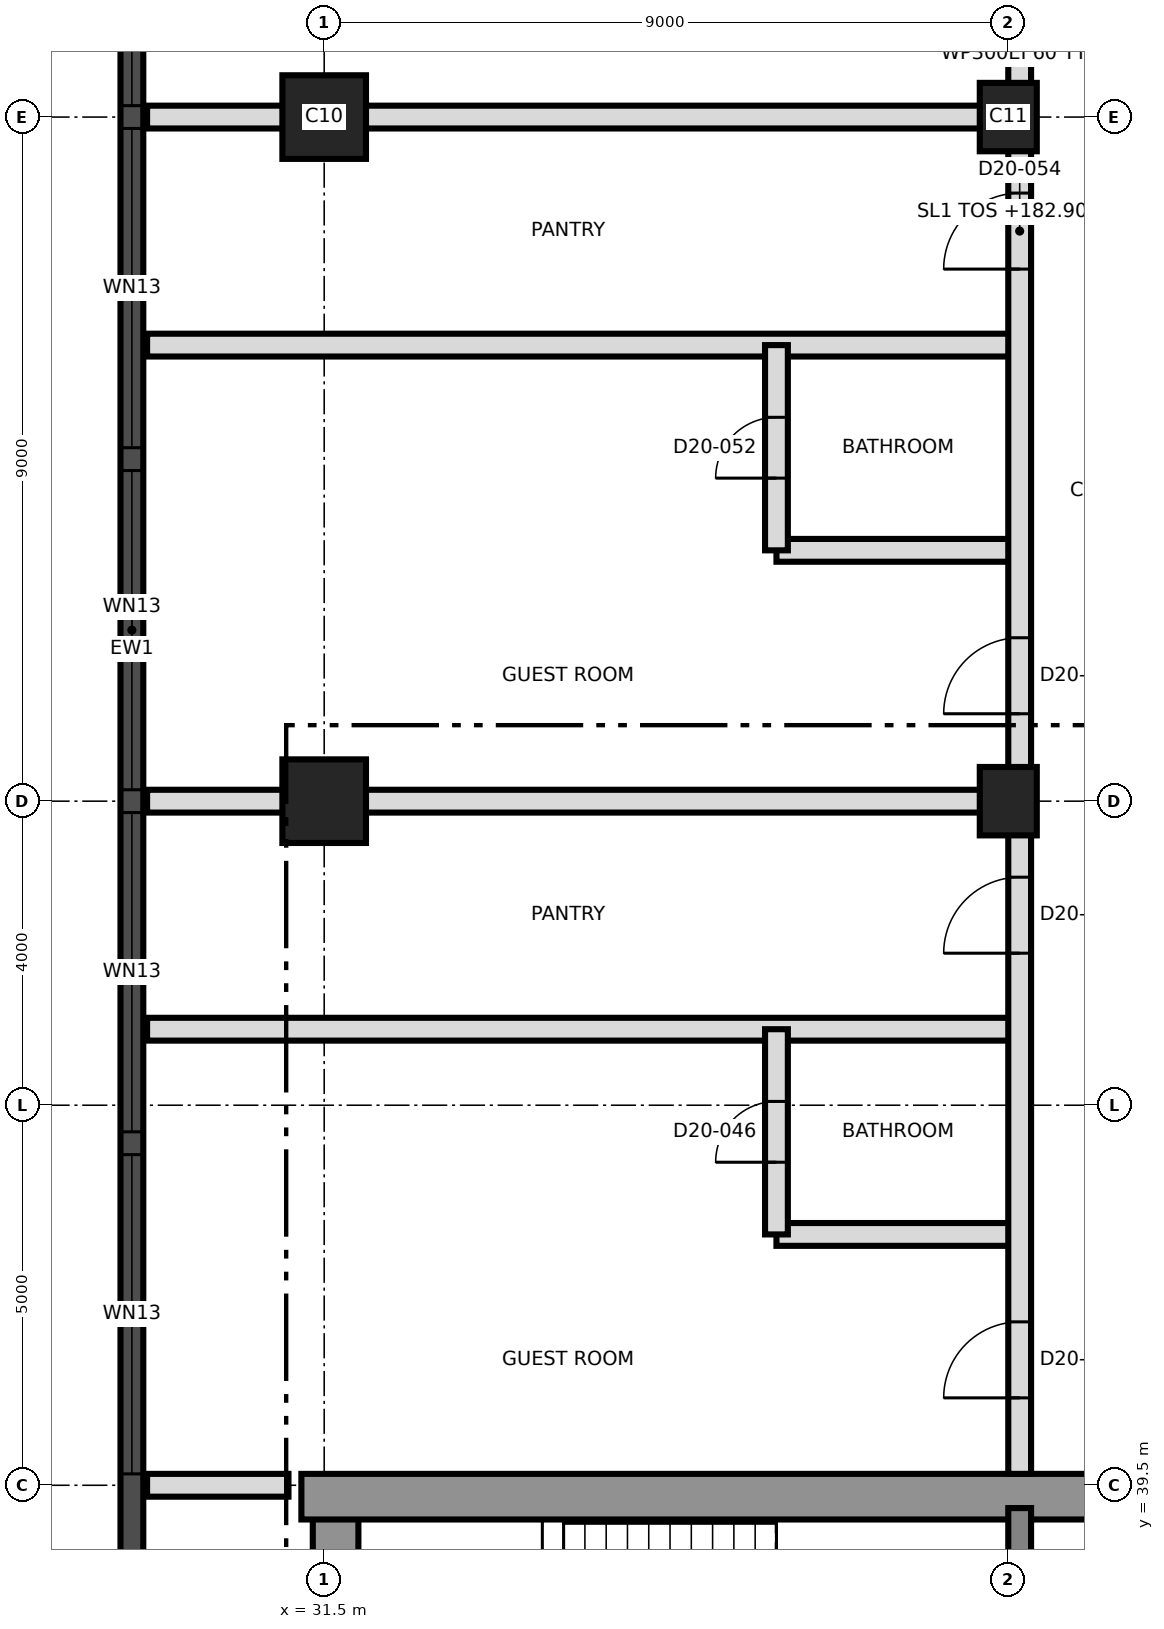
"""IFC4 building model, lengths in metres.
Left out: names, types, materials, properties, quantities, classifications, styles, units other than length and angle.
Written with IfcOpenShell. Run it as: python <this file> out.ifc"""

import sys

from ifc_helpers import new_model, si_unit, direction, frame, frame_2d, origin, origin_2d, place, context, subcontext, project, spatial, rectangle, extrude, element, fill, save


model = new_model("IFC4")
c1 = context("Model", 3, precision=1e-05, world=origin(), true_north=direction((0.0, 1.0)))
c2 = subcontext(c1, "Body", "Model", "MODEL_VIEW")
j1 = project(units=[si_unit("LENGTHUNIT", "METRE"), si_unit("PLANEANGLEUNIT", "RADIAN")], contexts=[c1])
p1 = place(None, origin())
s1 = spatial("IfcSite", under=j1, at=p1, CompositionType="ELEMENT")
p2 = place(p1, origin())
s2 = spatial("IfcBuilding", under=s1, at=p2, CompositionType="ELEMENT")
p3 = place(p2, frame((0.0, 0.0, 182.9)))
s3 = spatial("IfcBuildingStorey", under=s2, at=p3, CompositionType="ELEMENT", Elevation=182.9)
p4 = place(p3, frame((31.65, 21.8, 0.0), z_axis=(0.0, 0.0, 1.0), x_axis=(0.0, 1.0, 0.0)))
e1 = element("IfcWall", 1, at=p4, inside=s3, PredefinedType="SHEAR", context=c2, shape_type="SweptSolid", body=[
    extrude(rectangle(XDim=17.4, YDim=0.6, at=frame_2d((8.7, 0.0))), origin(), (0.0, 0.0, 1.0), 3.7),
])
p5 = place(p3, frame((31.2, 39.35, 0.0), z_axis=(0.0, 0.0, 1.0), x_axis=(1.0, 0.0, 0.0)))
e2 = element("IfcWall", 2, at=p5, inside=s3, PredefinedType="SHEAR", context=c2, shape_type="SweptSolid", body=[
    extrude(rectangle(XDim=27.0, YDim=0.6, at=frame_2d((13.5, 0.0))), origin(), (0.0, 0.0, 1.0), 3.7),
])
p6 = place(p5, frame((10.5, 0.0, 0.0)))
e3 = element("IfcOpeningElement", 3, at=p6, cuts=e2, PredefinedType="OPENING", context=c2, shape_type="SweptSolid", body=[
    extrude(rectangle(XDim=1.2, YDim=2.1, at=frame_2d((0.6, 1.05))), frame((0.0, 0.31, 0.0), z_axis=(0.0, -1.0, 0.0), x_axis=(1.0, 0.0, 0.0)), (0.0, 0.0, 1.0), 0.62),
])
p7 = place(p3, frame((40.65, 33.5, 0.0), z_axis=(0.0, 0.0, 1.0), x_axis=(0.0, 1.0, 0.0)))
e4 = element("IfcWall", 4, at=p7, inside=s3, PredefinedType="SHEAR", context=c2, shape_type="SweptSolid", body=[
    extrude(rectangle(XDim=5.7, YDim=0.3, at=frame_2d((2.85, 0.0))), origin(), (0.0, 0.0, 1.0), 3.7),
])
p8 = place(p3, frame((31.5, 48.5, 0.0), z_axis=(0.0, 0.0, 1.0), x_axis=(1.0, 0.0, 0.0)))
e5 = element("IfcColumn", 5, at=p8, inside=s3, PredefinedType="COLUMN", context=c2, shape_type="SweptSolid", body=[
    extrude(rectangle(XDim=1.1, YDim=1.1, at=origin_2d()), origin(), (0.0, 0.0, 1.0), 3.7),
])
p9 = place(p3, frame((40.5, 48.5, 0.0), z_axis=(0.0, 0.0, 1.0), x_axis=(0.0, 1.0, 0.0)))
e6 = element("IfcColumn", 6, at=p9, inside=s3, PredefinedType="COLUMN", context=c2, shape_type="SweptSolid", body=[
    extrude(rectangle(XDim=0.9, YDim=0.75, at=origin_2d()), origin(), (0.0, 0.0, 1.0), 3.7),
])
p10 = place(p3, frame((31.5, 57.5, 0.0), z_axis=(0.0, 0.0, 1.0), x_axis=(1.0, 0.0, 0.0)))
e7 = element("IfcColumn", 7, at=p10, inside=s3, PredefinedType="COLUMN", context=c2, shape_type="SweptSolid", body=[
    extrude(rectangle(XDim=1.1, YDim=1.1, at=origin_2d()), origin(), (0.0, 0.0, 1.0), 3.7),
])
p11 = place(p3, frame((40.5, 57.5, 0.0), z_axis=(0.0, 0.0, 1.0), x_axis=(0.0, 1.0, 0.0)))
e8 = element("IfcColumn", 8, at=p11, inside=s3, PredefinedType="COLUMN", context=c2, shape_type="SweptSolid", body=[
    extrude(rectangle(XDim=0.9, YDim=0.75, at=origin_2d()), origin(), (0.0, 0.0, 1.0), 3.7),
])
p12 = place(p3, frame((28.97, 66.986, 0.0), z_axis=(0.0, 0.0, 1.0), x_axis=(0.0, -1.0, 0.0)))
e9 = element("IfcWall", 9, at=p12, inside=s3, PredefinedType="SOLIDWALL", context=c2, shape_type="SweptSolid", body=[
    extrude(rectangle(XDim=32.976, YDim=0.3, at=frame_2d((16.488, 0.0))), origin(), (0.0, 0.0, 1.0), 3.4),
])
p13 = place(p12, frame((1.593, 0.0, 0.3)))
e10 = element("IfcOpeningElement", 10, at=p13, cuts=e9, PredefinedType="OPENING", context=c2, shape_type="SweptSolid", body=[
    extrude(rectangle(XDim=1.8, YDim=2.4, at=frame_2d((0.9, 1.2))), frame((0.0, 0.16, 0.0), z_axis=(0.0, -1.0, 0.0), x_axis=(1.0, 0.0, 0.0)), (0.0, 0.0, 1.0), 0.32),
])
p14 = place(p12, frame((5.136, 0.0, 0.9)))
e11 = element("IfcOpeningElement", 11, at=p14, cuts=e9, PredefinedType="OPENING", context=c2, shape_type="SweptSolid", body=[
    extrude(rectangle(XDim=4.2, YDim=1.7, at=frame_2d((2.1, 0.85))), frame((0.0, 0.16, 0.0), z_axis=(0.0, -1.0, 0.0), x_axis=(1.0, 0.0, 0.0)), (0.0, 0.0, 1.0), 0.32),
])
p15 = place(p12, frame((9.636, 0.0, 0.9)))
e12 = element("IfcOpeningElement", 12, at=p15, cuts=e9, PredefinedType="OPENING", context=c2, shape_type="SweptSolid", body=[
    extrude(rectangle(XDim=4.2, YDim=1.7, at=frame_2d((2.1, 0.85))), frame((0.0, 0.16, 0.0), z_axis=(0.0, -1.0, 0.0), x_axis=(1.0, 0.0, 0.0)), (0.0, 0.0, 1.0), 0.32),
])
p16 = place(p12, frame((14.136, 0.0, 0.9)))
e13 = element("IfcOpeningElement", 13, at=p16, cuts=e9, PredefinedType="OPENING", context=c2, shape_type="SweptSolid", body=[
    extrude(rectangle(XDim=4.2, YDim=1.7, at=frame_2d((2.1, 0.85))), frame((0.0, 0.16, 0.0), z_axis=(0.0, -1.0, 0.0), x_axis=(1.0, 0.0, 0.0)), (0.0, 0.0, 1.0), 0.32),
])
p17 = place(p12, frame((18.636, 0.0, 0.9)))
e14 = element("IfcOpeningElement", 14, at=p17, cuts=e9, PredefinedType="OPENING", context=c2, shape_type="SweptSolid", body=[
    extrude(rectangle(XDim=4.2, YDim=1.7, at=frame_2d((2.1, 0.85))), frame((0.0, 0.16, 0.0), z_axis=(0.0, -1.0, 0.0), x_axis=(1.0, 0.0, 0.0)), (0.0, 0.0, 1.0), 0.32),
])
p18 = place(p12, frame((23.136, 0.0, 0.9)))
e15 = element("IfcOpeningElement", 15, at=p18, cuts=e9, PredefinedType="OPENING", context=c2, shape_type="SweptSolid", body=[
    extrude(rectangle(XDim=4.2, YDim=1.7, at=frame_2d((2.1, 0.85))), frame((0.0, 0.16, 0.0), z_axis=(0.0, -1.0, 0.0), x_axis=(1.0, 0.0, 0.0)), (0.0, 0.0, 1.0), 0.32),
])
p19 = place(p12, frame((29.331, 0.0, 0.3)))
e16 = element("IfcOpeningElement", 16, at=p19, cuts=e9, PredefinedType="OPENING", context=c2, shape_type="SweptSolid", body=[
    extrude(rectangle(XDim=1.8, YDim=2.4, at=frame_2d((0.9, 1.2))), frame((0.0, 0.16, 0.0), z_axis=(0.0, -1.0, 0.0), x_axis=(1.0, 0.0, 0.0)), (0.0, 0.0, 1.0), 0.32),
])
p20 = place(p3, frame((29.17, 39.5, 0.0), z_axis=(0.0, 0.0, 1.0), x_axis=(1.0, 0.0, 0.0)))
e17 = element("IfcWall", 17, at=p20, inside=s3, PredefinedType="PARTITIONING", context=c2, shape_type="SweptSolid", body=[
    extrude(rectangle(XDim=1.86, YDim=0.3, at=frame_2d((0.93, 0.0))), origin(), (0.0, 0.0, 1.0), 3.4),
])
p21 = place(p3, frame((37.45, 42.8, 0.0), z_axis=(0.0, 0.0, 1.0), x_axis=(1.0, 0.0, 0.0)))
e18 = element("IfcWall", 18, at=p21, inside=s3, PredefinedType="PARTITIONING", context=c2, shape_type="SweptSolid", body=[
    extrude(rectangle(XDim=3.2, YDim=0.3, at=frame_2d((1.6, 0.0))), origin(), (0.0, 0.0, 1.0), 3.4),
])
for number, where, z_axis, x_axis in (
    (19, (29.17, 45.5, 0.0), (0.0, 0.0, 1.0), (1.0, 0.0, 0.0)),
    (20, (29.17, 48.5, 0.0), (0.0, 0.0, 1.0), (1.0, 0.0, 0.0)),
):
    element("IfcWall", number, at=place(p3, frame(where, z_axis=z_axis, x_axis=x_axis)), inside=s3, PredefinedType="PARTITIONING", context=c2, shape_type="SweptSolid", body=[
        extrude(rectangle(XDim=11.48, YDim=0.3, at=frame_2d((5.74, 0.0))), origin(), (0.0, 0.0, 1.0), 3.4),
    ])
p22 = place(p3, frame((37.45, 51.8, 0.0), z_axis=(0.0, 0.0, 1.0), x_axis=(1.0, 0.0, 0.0)))
e21 = element("IfcWall", 21, at=p22, inside=s3, PredefinedType="PARTITIONING", context=c2, shape_type="SweptSolid", body=[
    extrude(rectangle(XDim=3.2, YDim=0.3, at=frame_2d((1.6, 0.0))), origin(), (0.0, 0.0, 1.0), 3.4),
])
for number, where, z_axis, x_axis in (
    (22, (29.17, 54.5, 0.0), (0.0, 0.0, 1.0), (1.0, 0.0, 0.0)),
    (23, (29.17, 57.5, 0.0), (0.0, 0.0, 1.0), (1.0, 0.0, 0.0)),
):
    element("IfcWall", number, at=place(p3, frame(where, z_axis=z_axis, x_axis=x_axis)), inside=s3, PredefinedType="PARTITIONING", context=c2, shape_type="SweptSolid", body=[
        extrude(rectangle(XDim=11.48, YDim=0.3, at=frame_2d((5.74, 0.0))), origin(), (0.0, 0.0, 1.0), 3.4),
    ])
p23 = place(p3, frame((37.45, 42.8, 0.0), z_axis=(0.0, 0.0, 1.0), x_axis=(0.0, 1.0, 0.0)))
e24 = element("IfcWall", 24, at=p23, inside=s3, PredefinedType="PARTITIONING", context=c2, shape_type="SweptSolid", body=[
    extrude(rectangle(XDim=2.7, YDim=0.3, at=frame_2d((1.35, 0.0))), origin(), (0.0, 0.0, 1.0), 3.4),
])
p24 = place(p23, frame((0.95, 0.0, 0.0)))
e25 = element("IfcOpeningElement", 25, at=p24, cuts=e24, PredefinedType="OPENING", context=c2, shape_type="SweptSolid", body=[
    extrude(rectangle(XDim=0.8, YDim=2.1, at=frame_2d((0.4, 1.05))), frame((0.0, 0.16, 0.0), z_axis=(0.0, -1.0, 0.0), x_axis=(1.0, 0.0, 0.0)), (0.0, 0.0, 1.0), 0.32),
])
p25 = place(p3, frame((37.45, 51.8, 0.0), z_axis=(0.0, 0.0, 1.0), x_axis=(0.0, 1.0, 0.0)))
e26 = element("IfcWall", 26, at=p25, inside=s3, PredefinedType="PARTITIONING", context=c2, shape_type="SweptSolid", body=[
    extrude(rectangle(XDim=2.7, YDim=0.3, at=frame_2d((1.35, 0.0))), origin(), (0.0, 0.0, 1.0), 3.4),
])
p26 = place(p25, frame((0.95, 0.0, 0.0)))
e27 = element("IfcOpeningElement", 27, at=p26, cuts=e26, PredefinedType="OPENING", context=c2, shape_type="SweptSolid", body=[
    extrude(rectangle(XDim=0.8, YDim=2.1, at=frame_2d((0.4, 1.05))), frame((0.0, 0.16, 0.0), z_axis=(0.0, -1.0, 0.0), x_axis=(1.0, 0.0, 0.0)), (0.0, 0.0, 1.0), 0.32),
])
p27 = place(p3, frame((40.65, 39.65, 0.0), z_axis=(0.0, 0.0, 1.0), x_axis=(0.0, 1.0, 0.0)))
e28 = element("IfcWall", 28, at=p27, inside=s3, PredefinedType="PARTITIONING", context=c2, shape_type="SweptSolid", body=[
    extrude(rectangle(XDim=37.35, YDim=0.3, at=frame_2d((18.675, 0.0))), origin(), (0.0, 0.0, 1.0), 3.4),
])
p28 = place(p27, frame((1.0, 0.0, 0.0)))
e29 = element("IfcOpeningElement", 29, at=p28, cuts=e28, PredefinedType="OPENING", context=c2, shape_type="SweptSolid", body=[
    extrude(rectangle(XDim=1.0, YDim=2.1, at=frame_2d((0.5, 1.05))), frame((0.0, 0.16, 0.0), z_axis=(0.0, -1.0, 0.0), x_axis=(1.0, 0.0, 0.0)), (0.0, 0.0, 1.0), 0.32),
])
p29 = place(p27, frame((6.85, 0.0, 0.0)))
e30 = element("IfcOpeningElement", 30, at=p29, cuts=e28, PredefinedType="OPENING", context=c2, shape_type="SweptSolid", body=[
    extrude(rectangle(XDim=1.0, YDim=2.1, at=frame_2d((0.5, 1.05))), frame((0.0, 0.16, 0.0), z_axis=(0.0, -1.0, 0.0), x_axis=(1.0, 0.0, 0.0)), (0.0, 0.0, 1.0), 0.32),
])
p30 = place(p27, frame((10.0, 0.0, 0.0)))
e31 = element("IfcOpeningElement", 31, at=p30, cuts=e28, PredefinedType="OPENING", context=c2, shape_type="SweptSolid", body=[
    extrude(rectangle(XDim=1.0, YDim=2.1, at=frame_2d((0.5, 1.05))), frame((0.0, 0.16, 0.0), z_axis=(0.0, -1.0, 0.0), x_axis=(1.0, 0.0, 0.0)), (0.0, 0.0, 1.0), 0.32),
])
p31 = place(p27, frame((15.85, 0.0, 0.0)))
e32 = element("IfcOpeningElement", 32, at=p31, cuts=e28, PredefinedType="OPENING", context=c2, shape_type="SweptSolid", body=[
    extrude(rectangle(XDim=1.0, YDim=2.1, at=frame_2d((0.5, 1.05))), frame((0.0, 0.16, 0.0), z_axis=(0.0, -1.0, 0.0), x_axis=(1.0, 0.0, 0.0)), (0.0, 0.0, 1.0), 0.32),
])
p32 = place(p27, frame((21.35, 0.0, 0.0)))
e33 = element("IfcOpeningElement", 33, at=p32, cuts=e28, PredefinedType="OPENING", context=c2, shape_type="SweptSolid", body=[
    extrude(rectangle(XDim=1.0, YDim=2.1, at=frame_2d((0.5, 1.05))), frame((0.0, 0.16, 0.0), z_axis=(0.0, -1.0, 0.0), x_axis=(1.0, 0.0, 0.0)), (0.0, 0.0, 1.0), 0.32),
])
p33 = place(p14, origin())
e34 = element("IfcWindow", 34, at=p33, inside=s3, PartitioningType="SINGLE_PANEL", PredefinedType="WINDOW", context=c2, shape_type="SweptSolid", body=[
    extrude(rectangle(XDim=4.2, YDim=1.7, at=frame_2d((2.1, 0.85))), frame((0.0, 0.03, 0.0), z_axis=(0.0, -1.0, 0.0), x_axis=(1.0, 0.0, 0.0)), (0.0, 0.0, 1.0), 0.06),
])
fill(e11, e34)
p34 = place(p15, origin())
e35 = element("IfcWindow", 35, at=p34, inside=s3, PartitioningType="SINGLE_PANEL", PredefinedType="WINDOW", context=c2, shape_type="SweptSolid", body=[
    extrude(rectangle(XDim=4.2, YDim=1.7, at=frame_2d((2.1, 0.85))), frame((0.0, 0.03, 0.0), z_axis=(0.0, -1.0, 0.0), x_axis=(1.0, 0.0, 0.0)), (0.0, 0.0, 1.0), 0.06),
])
fill(e12, e35)
p35 = place(p16, origin())
e36 = element("IfcWindow", 36, at=p35, inside=s3, PartitioningType="SINGLE_PANEL", PredefinedType="WINDOW", context=c2, shape_type="SweptSolid", body=[
    extrude(rectangle(XDim=4.2, YDim=1.7, at=frame_2d((2.1, 0.85))), frame((0.0, 0.03, 0.0), z_axis=(0.0, -1.0, 0.0), x_axis=(1.0, 0.0, 0.0)), (0.0, 0.0, 1.0), 0.06),
])
fill(e13, e36)
p36 = place(p17, origin())
e37 = element("IfcWindow", 37, at=p36, inside=s3, PartitioningType="SINGLE_PANEL", PredefinedType="WINDOW", context=c2, shape_type="SweptSolid", body=[
    extrude(rectangle(XDim=4.2, YDim=1.7, at=frame_2d((2.1, 0.85))), frame((0.0, 0.03, 0.0), z_axis=(0.0, -1.0, 0.0), x_axis=(1.0, 0.0, 0.0)), (0.0, 0.0, 1.0), 0.06),
])
fill(e14, e37)
p37 = place(p18, origin())
e38 = element("IfcWindow", 38, at=p37, inside=s3, PartitioningType="SINGLE_PANEL", PredefinedType="WINDOW", context=c2, shape_type="SweptSolid", body=[
    extrude(rectangle(XDim=4.2, YDim=1.7, at=frame_2d((2.1, 0.85))), frame((0.0, 0.03, 0.0), z_axis=(0.0, -1.0, 0.0), x_axis=(1.0, 0.0, 0.0)), (0.0, 0.0, 1.0), 0.06),
])
fill(e15, e38)
p38 = place(p24, origin())
e39 = element("IfcDoor", 39, at=p38, inside=s3, OperationType="SINGLE_SWING_RIGHT", PredefinedType="DOOR", context=c2, shape_type="SweptSolid", body=[
    extrude(rectangle(XDim=0.8, YDim=2.1, at=frame_2d((0.4, 1.05))), frame((0.0, 0.025, 0.0), z_axis=(0.0, -1.0, 0.0), x_axis=(1.0, 0.0, 0.0)), (0.0, 0.0, 1.0), 0.05),
])
fill(e25, e39)
p39 = place(p28, origin())
e40 = element("IfcDoor", 40, at=p39, inside=s3, OperationType="SINGLE_SWING_LEFT", PredefinedType="DOOR", context=c2, shape_type="SweptSolid", body=[
    extrude(rectangle(XDim=1.0, YDim=2.1, at=frame_2d((0.5, 1.05))), frame((0.0, 0.025, 0.0), z_axis=(0.0, -1.0, 0.0), x_axis=(1.0, 0.0, 0.0)), (0.0, 0.0, 1.0), 0.05),
])
fill(e29, e40)
p40 = place(p29, origin())
e41 = element("IfcDoor", 41, at=p40, inside=s3, OperationType="SINGLE_SWING_LEFT", PredefinedType="DOOR", context=c2, shape_type="SweptSolid", body=[
    extrude(rectangle(XDim=1.0, YDim=2.1, at=frame_2d((0.5, 1.05))), frame((0.0, 0.025, 0.0), z_axis=(0.0, -1.0, 0.0), x_axis=(1.0, 0.0, 0.0)), (0.0, 0.0, 1.0), 0.05),
])
fill(e30, e41)
p41 = place(p26, origin())
e42 = element("IfcDoor", 42, at=p41, inside=s3, OperationType="SINGLE_SWING_RIGHT", PredefinedType="DOOR", context=c2, shape_type="SweptSolid", body=[
    extrude(rectangle(XDim=0.8, YDim=2.1, at=frame_2d((0.4, 1.05))), frame((0.0, 0.025, 0.0), z_axis=(0.0, -1.0, 0.0), x_axis=(1.0, 0.0, 0.0)), (0.0, 0.0, 1.0), 0.05),
])
fill(e27, e42)
p42 = place(p30, origin())
e43 = element("IfcDoor", 43, at=p42, inside=s3, OperationType="SINGLE_SWING_LEFT", PredefinedType="DOOR", context=c2, shape_type="SweptSolid", body=[
    extrude(rectangle(XDim=1.0, YDim=2.1, at=frame_2d((0.5, 1.05))), frame((0.0, 0.025, 0.0), z_axis=(0.0, -1.0, 0.0), x_axis=(1.0, 0.0, 0.0)), (0.0, 0.0, 1.0), 0.05),
])
fill(e31, e43)
p43 = place(p31, origin())
e44 = element("IfcDoor", 44, at=p43, inside=s3, OperationType="SINGLE_SWING_LEFT", PredefinedType="DOOR", context=c2, shape_type="SweptSolid", body=[
    extrude(rectangle(XDim=1.0, YDim=2.1, at=frame_2d((0.5, 1.05))), frame((0.0, 0.025, 0.0), z_axis=(0.0, -1.0, 0.0), x_axis=(1.0, 0.0, 0.0)), (0.0, 0.0, 1.0), 0.05),
])
fill(e32, e44)
save(model, sys.argv[1])
